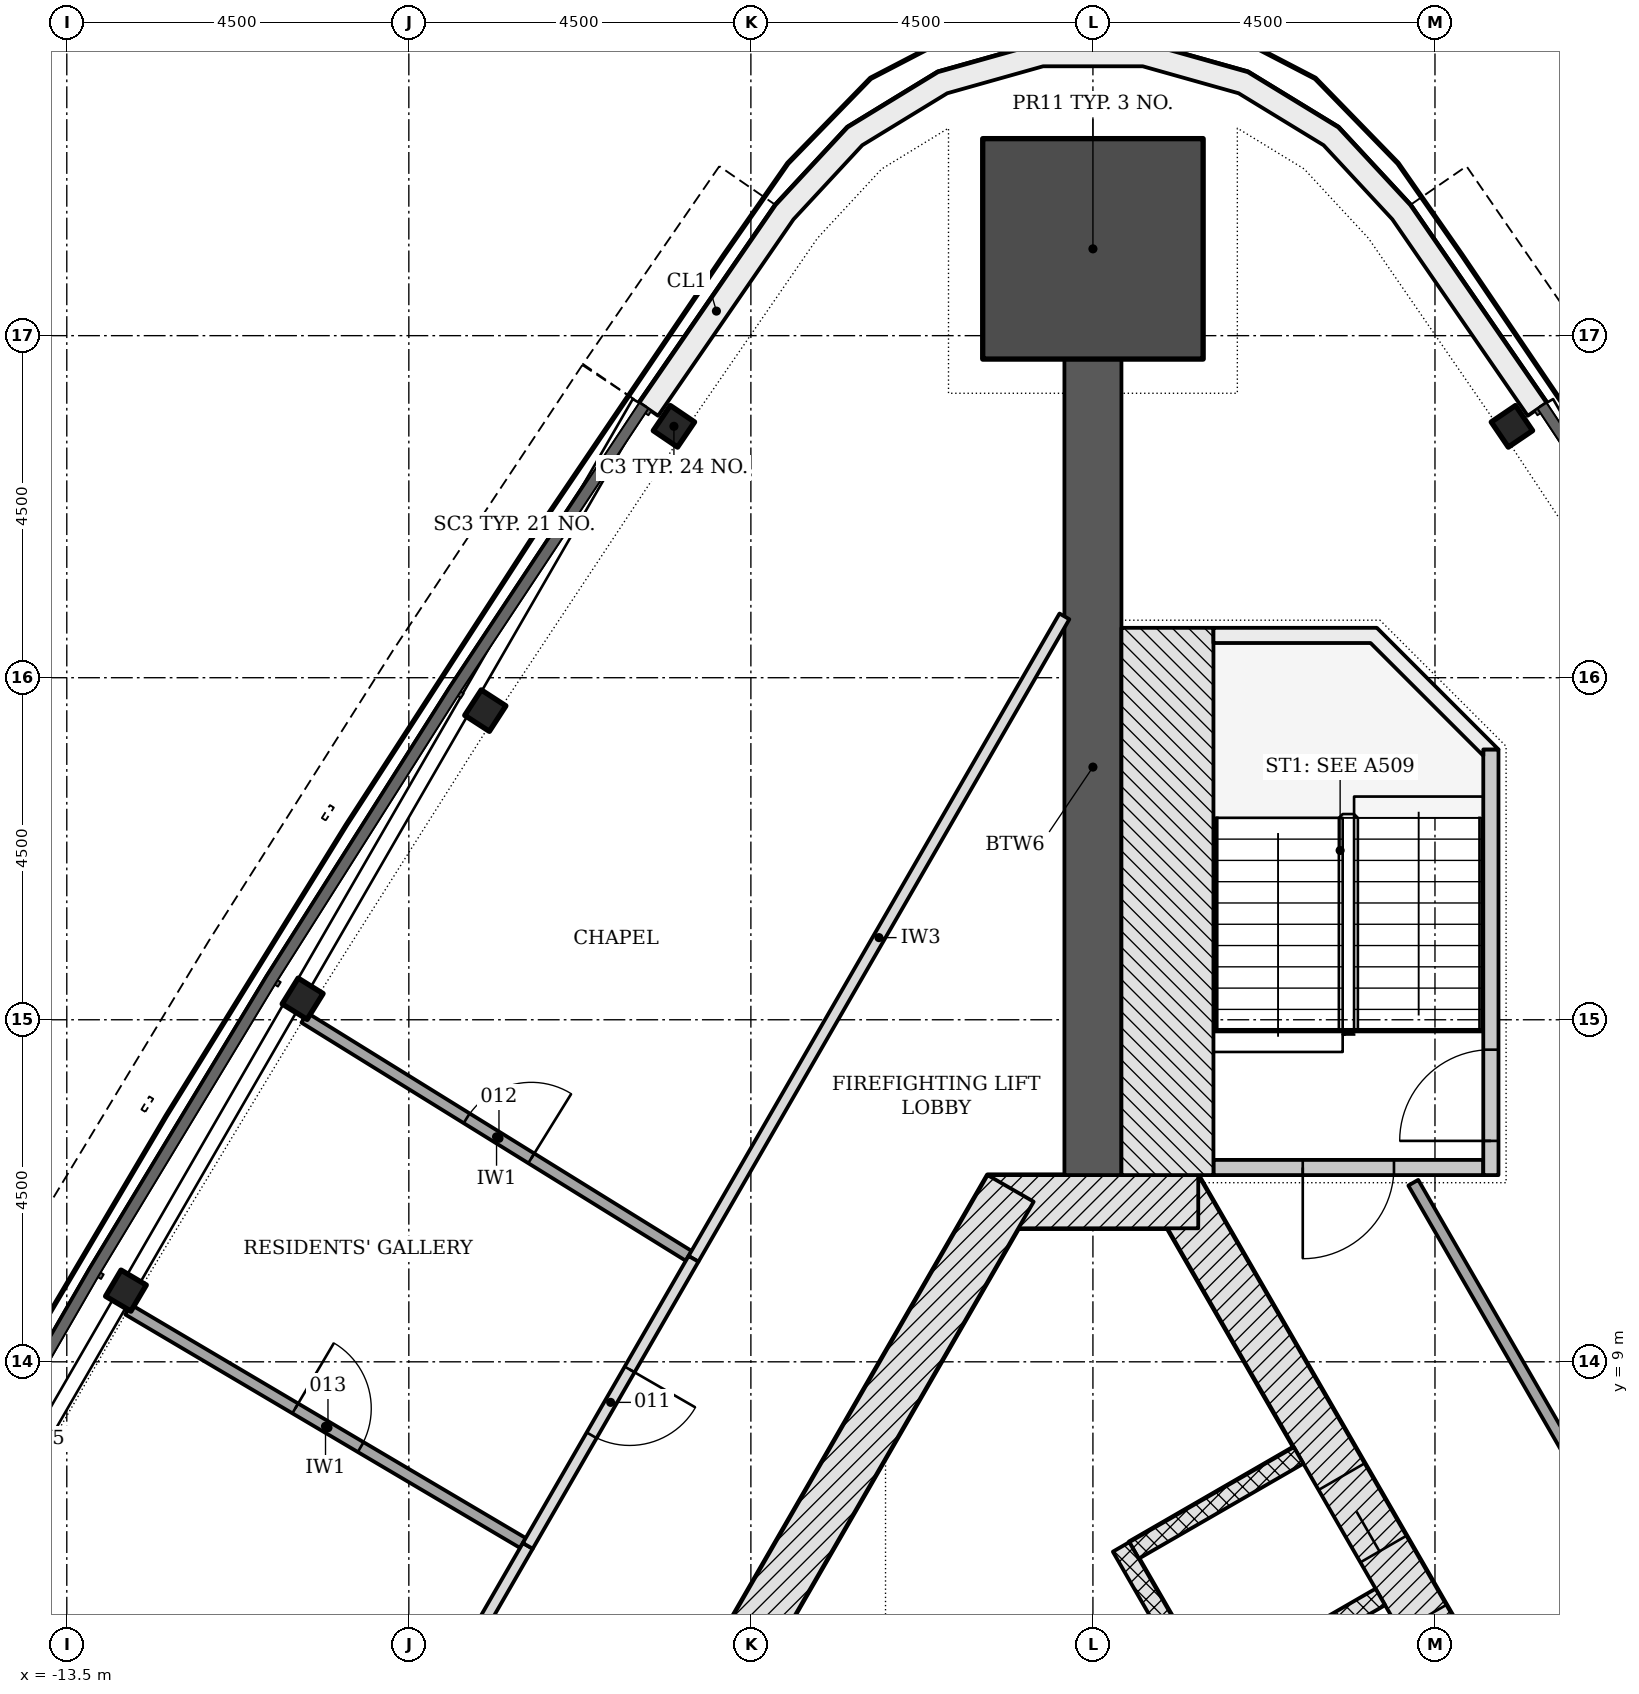
"""IFC4 building model, lengths in metres.
Left out: names, types, materials, properties, quantities, classifications, styles, units other than length and angle.
Written with IfcOpenShell. Run it as: python <this file> out.ifc"""

import sys

from ifc_helpers import new_model, si_unit, direction, frame, frame_2d, origin, origin_2d, place, context, subcontext, project, spatial, polyline, rectangle, i_section, outline, extrude, element, fill, save


model = new_model("IFC4")
c1 = context("Model", 3, precision=1e-05, world=origin(), true_north=direction((0.0, 1.0)))
c2 = subcontext(c1, "Body", "Model", "MODEL_VIEW")
j1 = project(units=[si_unit("LENGTHUNIT", "METRE"), si_unit("PLANEANGLEUNIT", "RADIAN")], contexts=[c1])
p1 = place(None, origin())
s1 = spatial("IfcSite", under=j1, at=p1, CompositionType="ELEMENT")
p2 = place(p1, origin())
s2 = spatial("IfcBuilding", under=s1, at=p2, CompositionType="ELEMENT")
p3 = place(p2, frame((0.0, 0.0, 150.9)))
s3 = spatial("IfcBuildingStorey", under=s2, at=p3, CompositionType="ELEMENT", Elevation=150.9)
p4 = place(p3, frame((10.311, -4.703, -0.2), z_axis=(0.0, 0.0, 1.0), x_axis=(-0.500001446645, 0.866024568562, 0.0)))
e1 = element("IfcWall", 1, at=p4, inside=s3, PredefinedType="SHEAR", context=c2, shape_type="SweptSolid", body=[
    extrude(rectangle(XDim=18.458, YDim=0.7, at=frame_2d((9.229, 0.0))), origin(), (0.0, 0.0, 1.0), 3.6),
])
p5 = place(p4, frame((4.379, 0.0, 0.2)))
e2 = element("IfcOpeningElement", 2, at=p5, cuts=e1, PredefinedType="OPENING", context=c2, shape_type="SweptSolid", body=[
    extrude(rectangle(XDim=1.1, YDim=2.1, at=frame_2d((0.55, 1.05))), frame((0.0, 0.36, 0.0), z_axis=(0.0, -1.0, 0.0), x_axis=(1.0, 0.0, 0.0)), (0.0, 0.0, 1.0), 0.72),
])
p6 = place(p4, frame((6.529, 0.0, 0.2)))
e3 = element("IfcOpeningElement", 3, at=p6, cuts=e1, PredefinedType="OPENING", context=c2, shape_type="SweptSolid", body=[
    extrude(rectangle(XDim=1.1, YDim=2.1, at=frame_2d((0.55, 1.05))), frame((0.0, 0.36, 0.0), z_axis=(0.0, -1.0, 0.0), x_axis=(1.0, 0.0, 0.0)), (0.0, 0.0, 1.0), 0.72),
])
p7 = place(p4, frame((8.679, 0.0, 0.2)))
e4 = element("IfcOpeningElement", 4, at=p7, cuts=e1, PredefinedType="OPENING", context=c2, shape_type="SweptSolid", body=[
    extrude(rectangle(XDim=1.1, YDim=2.1, at=frame_2d((0.55, 1.05))), frame((0.0, 0.36, 0.0), z_axis=(0.0, -1.0, 0.0), x_axis=(1.0, 0.0, 0.0)), (0.0, 0.0, 1.0), 0.72),
])
p8 = place(p4, frame((10.829, 0.0, 0.2)))
e5 = element("IfcOpeningElement", 5, at=p8, cuts=e1, PredefinedType="OPENING", context=c2, shape_type="SweptSolid", body=[
    extrude(rectangle(XDim=1.1, YDim=2.1, at=frame_2d((0.55, 1.05))), frame((0.0, 0.36, 0.0), z_axis=(0.0, -1.0, 0.0), x_axis=(1.0, 0.0, 0.0)), (0.0, 0.0, 1.0), 0.72),
])
p9 = place(p4, frame((12.979, 0.0, 0.2)))
e6 = element("IfcOpeningElement", 6, at=p9, cuts=e1, PredefinedType="OPENING", context=c2, shape_type="SweptSolid", body=[
    extrude(rectangle(XDim=1.1, YDim=2.1, at=frame_2d((0.55, 1.05))), frame((0.0, 0.36, 0.0), z_axis=(0.0, -1.0, 0.0), x_axis=(1.0, 0.0, 0.0)), (0.0, 0.0, 1.0), 0.72),
])
p10 = place(p3, frame((1.386, 11.106, -0.2), z_axis=(0.0, 0.0, 1.0), x_axis=(-1.0, 0.0, 0.0)))
e7 = element("IfcWall", 7, at=p10, inside=s3, PredefinedType="SHEAR", context=c2, shape_type="SweptSolid", body=[
    extrude(rectangle(XDim=2.771, YDim=0.7, at=frame_2d((1.386, 0.0))), origin(), (0.0, 0.0, 1.0), 3.6),
])
p11 = place(p3, frame((-1.083, 11.281, -0.2), z_axis=(0.0, 0.0, 1.0), x_axis=(-0.500001446645, -0.866024568562, 0.0)))
e8 = element("IfcWall", 8, at=p11, inside=s3, PredefinedType="SHEAR", context=c2, shape_type="SweptSolid", body=[
    extrude(rectangle(XDim=18.458, YDim=0.7, at=frame_2d((9.229, 0.0))), origin(), (0.0, 0.0, 1.0), 3.6),
])
p12 = place(p11, frame((8.979, 0.0, 0.2)))
e9 = element("IfcOpeningElement", 9, at=p12, cuts=e8, PredefinedType="OPENING", context=c2, shape_type="SweptSolid", body=[
    extrude(rectangle(XDim=1.2, YDim=2.1, at=frame_2d((0.6, 1.05))), frame((0.0, 0.36, 0.0), z_axis=(0.0, -1.0, 0.0), x_axis=(1.0, 0.0, 0.0)), (0.0, 0.0, 1.0), 0.72),
])
p13 = place(p11, frame((11.029, 0.0, 0.2)))
e10 = element("IfcOpeningElement", 10, at=p13, cuts=e8, PredefinedType="OPENING", context=c2, shape_type="SweptSolid", body=[
    extrude(rectangle(XDim=1.2, YDim=2.1, at=frame_2d((0.6, 1.05))), frame((0.0, 0.36, 0.0), z_axis=(0.0, -1.0, 0.0), x_axis=(1.0, 0.0, 0.0)), (0.0, 0.0, 1.0), 0.72),
])
p14 = place(p3, frame((0.0, 11.456, -0.2), z_axis=(0.0, 0.0, 1.0), x_axis=(0.0, 1.0, 0.0)))
e11 = element("IfcWall", 11, at=p14, inside=s3, PredefinedType="SHEAR", context=c2, shape_type="SweptSolid", body=[
    extrude(rectangle(XDim=10.736, YDim=0.75, at=frame_2d((5.368, 0.0))), origin(), (0.0, 0.0, 1.0), 3.6),
])
p15 = place(p3, frame((0.0, 23.642, -0.2), z_axis=(0.0, 0.0, 1.0), x_axis=(0.0, 1.0, 0.0)))
e12 = element("IfcColumn", 12, at=p15, inside=s3, PredefinedType="COLUMN", context=c2, shape_type="SweptSolid", body=[
    extrude(rectangle(XDim=2.9, YDim=2.9, at=origin_2d()), origin(), (0.0, 0.0, 1.0), 3.6),
])
for number, where, z_axis, x_axis in (
    (13, (-5.512, 21.307, -0.2), (0.0, 0.0, 1.0), (-0.561, -0.828, 0.0)),
    (14, (-7.994, 17.567, -0.2), (0.0, 0.0, 1.0), (-0.544, -0.839, 0.0)),
    (15, (-10.397, 13.776, -0.2), (0.0, 0.0, 1.0), (-0.527, -0.85, 0.0)),
    (16, (-12.722, 9.936, -0.2), (0.0, 0.0, 1.0), (-0.509, -0.861, 0.0)),
    (17, (5.512, 21.307, -0.2), (0.0, 0.0, 1.0), (-0.561, 0.828, 0.0)),
):
    element("IfcColumn", number, at=place(p3, frame(where, z_axis=z_axis, x_axis=x_axis)), inside=s3, PredefinedType="COLUMN", context=c2, shape_type="SweptSolid", body=[
        extrude(i_section(OverallWidth=0.399, OverallDepth=0.386, WebThickness=0.021, FlangeThickness=0.033, FilletRadius=0.015, at=origin_2d()), origin(), (0.0, 0.0, 1.0), 3.6),
    ])
p16 = place(p3, origin())
e18 = element("IfcWall", 18, at=p16, inside=s3, PredefinedType="NOTDEFINED", context=c2, shape_type="SweptSolid", body=[
    extrude(outline(polyline([(5.968, 21.616), (4.174, 24.219), (3.227, 25.24), (2.038, 25.967), (0.697, 26.344), (-0.697, 26.344), (-2.038, 25.967), (-3.227, 25.24), (-4.174, 24.219), (-5.968, 21.616), (-5.721, 21.446), (-3.939, 24.03), (-3.035, 25.005), (-1.917, 25.689), (-0.655, 26.044), (0.655, 26.044), (1.917, 25.689), (3.035, 25.005), (3.939, 24.03), (5.721, 21.446), (5.968, 21.616)])), origin(), (0.0, 0.0, 1.0), 3.3),
])
for number, where, z_axis, x_axis in (
    (19, (3.781, 5.907, -0.2), (0.0, 0.0, 1.0), (-0.866, -0.5, 0.0)),
    (20, (2.706, 7.769, -0.2), (0.0, 0.0, 1.0), (-0.866, -0.5, 0.0)),
):
    element("IfcWall", number, at=place(p3, frame(where, z_axis=z_axis, x_axis=x_axis)), inside=s3, PredefinedType="PARTITIONING", context=c2, shape_type="SweptSolid", body=[
        extrude(rectangle(XDim=2.5, YDim=0.25, at=frame_2d((1.25, 0.0))), origin(), (0.0, 0.0, 1.0), 3.6),
    ])
p17 = place(p3, frame((5.87, -2.961, 0.0), z_axis=(0.0, 0.0, 1.0), x_axis=(-0.50000615651, 0.866021849293, 0.0)))
e21 = element("IfcWall", 21, at=p17, inside=s3, PredefinedType="PARTITIONING", context=c2, shape_type="SweptSolid", body=[
    extrude(rectangle(XDim=11.0, YDim=0.25, at=frame_2d((5.5, 0.0))), origin(), (0.0, 0.0, 1.0), 3.4),
])
p18 = place(p3, frame((5.135, 11.556, -0.2), z_axis=(0.0, 0.0, 1.0), x_axis=(-1.0, 0.0, 0.0)))
e22 = element("IfcWall", 22, at=p18, inside=s3, PredefinedType="SHEAR", context=c2, shape_type="SweptSolid", body=[
    extrude(rectangle(XDim=3.55, YDim=0.2, at=frame_2d((1.775, 0.0))), origin(), (0.0, 0.0, 1.0), 3.6),
])
p19 = place(p18, frame((1.175, 0.0, 0.2)))
e23 = element("IfcOpeningElement", 23, at=p19, cuts=e22, PredefinedType="OPENING", context=c2, shape_type="SweptSolid", body=[
    extrude(rectangle(XDim=1.2, YDim=2.1, at=frame_2d((0.6, 1.05))), frame((0.0, 0.11, 0.0), z_axis=(0.0, -1.0, 0.0), x_axis=(1.0, 0.0, 0.0)), (0.0, 0.0, 1.0), 0.22),
])
p20 = place(p3, frame((5.236, 11.456, -0.2), z_axis=(0.0, 0.0, 1.0), x_axis=(0.0, 1.0, 0.0)))
e24 = element("IfcWall", 24, at=p20, inside=s3, PredefinedType="SHEAR", context=c2, shape_type="SweptSolid", body=[
    extrude(rectangle(XDim=5.6, YDim=0.2, at=frame_2d((2.8, 0.0))), origin(), (0.0, 0.0, 1.0), 3.6),
])
p21 = place(p20, frame((0.45, 0.0, 0.2)))
e25 = element("IfcOpeningElement", 25, at=p21, cuts=e24, PredefinedType="OPENING", context=c2, shape_type="SweptSolid", body=[
    extrude(rectangle(XDim=1.2, YDim=2.1, at=frame_2d((0.6, 1.05))), frame((0.0, 0.11, 0.0), z_axis=(0.0, -1.0, 0.0), x_axis=(1.0, 0.0, 0.0)), (0.0, 0.0, 1.0), 0.22),
])
p22 = place(p3, frame((0.98, 11.456, -0.2), z_axis=(0.0, 0.0, 1.0), x_axis=(0.0, 1.0, 0.0)))
e26 = element("IfcWall", 26, at=p22, inside=s3, PredefinedType="SHEAR", context=c2, shape_type="SweptSolid", body=[
    extrude(rectangle(XDim=7.2, YDim=1.211, at=frame_2d((3.6, 0.0))), origin(), (0.0, 0.0, 1.0), 3.6),
])
p23 = place(p3, frame((0.0, 0.0, -0.2)))
e27 = element("IfcWall", 27, at=p23, inside=s3, PredefinedType="SHEAR", context=c2, shape_type="SweptSolid", body=[
    extrude(outline(polyline([(5.336, 17.056), (3.736, 18.656), (1.586, 18.656), (1.586, 18.456), (3.653, 18.456), (5.135, 16.974), (5.135, 17.056), (5.135, 17.056), (5.135, 17.056), (5.135, 17.056), (5.135, 17.056), (5.135, 17.056), (5.135, 17.056), (5.135, 17.056), (5.135, 17.056), (5.135, 17.056), (5.135, 17.056), (5.135, 17.056), (5.135, 17.056), (5.135, 17.056), (5.135, 17.056), (5.135, 17.056), (5.135, 17.056), (5.336, 17.056)])), origin(), (0.0, 0.0, 1.0), 3.6),
])
p24 = place(p3, frame((9.066, 2.953, 0.0), z_axis=(0.0, 0.0, 1.0), x_axis=(-0.500003417229, 0.866023430837, 0.0)))
e28 = element("IfcWall", 28, at=p24, inside=s3, PredefinedType="PARTITIONING", context=c2, shape_type="SweptSolid", body=[
    extrude(rectangle(XDim=9.703, YDim=0.15, at=frame_2d((4.852, 0.0))), origin(), (0.0, 0.0, 1.0), 2.847),
])
p25 = place(p3, frame((-0.375, 18.807, 0.0), z_axis=(0.0, 0.0, 1.0), x_axis=(-0.500002508028, -0.866023955769, 0.0)))
e29 = element("IfcWall", 29, at=p25, inside=s3, PredefinedType="PARTITIONING", context=c2, shape_type="SweptSolid", body=[
    extrude(rectangle(XDim=9.76, YDim=0.15, at=frame_2d((4.88, 0.0))), origin(), (0.0, 0.0, 1.0), 2.847),
])
p26 = place(p3, frame((-7.435, 6.578, 0.0), z_axis=(0.0, 0.0, 1.0), x_axis=(-0.499998996204, -0.866025983326, 0.0)))
e30 = element("IfcWall", 30, at=p26, inside=s3, PredefinedType="PARTITIONING", context=c2, shape_type="SweptSolid", body=[
    extrude(rectangle(XDim=9.476, YDim=0.15, at=frame_2d((4.738, 0.0))), origin(), (0.0, 0.0, 1.0), 2.847),
])
p27 = place(p3, frame((-10.374, 13.526, 0.0), z_axis=(0.0, 0.0, 1.0), x_axis=(0.85006997005, -0.526669769418, 0.0)))
e31 = element("IfcWall", 31, at=p27, inside=s3, PredefinedType="PARTITIONING", context=c2, shape_type="SweptSolid", body=[
    extrude(rectangle(XDim=5.947, YDim=0.15, at=frame_2d((2.973, 0.0))), origin(), (0.0, 0.0, 1.0), 3.4),
])
p28 = place(p27, frame((2.511, 0.0, 0.0)))
e32 = element("IfcOpeningElement", 32, at=p28, cuts=e31, PredefinedType="OPENING", context=c2, shape_type="SweptSolid", body=[
    extrude(rectangle(XDim=1.0, YDim=2.1, at=frame_2d((0.5, 1.05))), frame((0.0, 0.085, 0.0), z_axis=(0.0, -1.0, 0.0), x_axis=(1.0, 0.0, 0.0)), (0.0, 0.0, 1.0), 0.17),
])
p29 = place(p3, frame((-12.693, 9.687, 0.0), z_axis=(0.0, 0.0, 1.0), x_axis=(0.860795979621, -0.508950175821, 0.0)))
e33 = element("IfcWall", 33, at=p29, inside=s3, PredefinedType="PARTITIONING", context=c2, shape_type="SweptSolid", body=[
    extrude(rectangle(XDim=6.033, YDim=0.15, at=frame_2d((3.016, 0.0))), origin(), (0.0, 0.0, 1.0), 3.4),
])
p30 = place(p29, frame((2.554, 0.0, 0.0)))
e34 = element("IfcOpeningElement", 34, at=p30, cuts=e33, PredefinedType="OPENING", context=c2, shape_type="SweptSolid", body=[
    extrude(rectangle(XDim=1.0, YDim=2.1, at=frame_2d((0.5, 1.05))), frame((0.0, 0.085, 0.0), z_axis=(0.0, -1.0, 0.0), x_axis=(1.0, 0.0, 0.0)), (0.0, 0.0, 1.0), 0.17),
])
p31 = place(p3, frame((-5.255, 10.355, 0.0), z_axis=(0.0, 0.0, 1.0), x_axis=(-0.499980937175, -0.866036409432, 0.0)))
e35 = element("IfcWall", 35, at=p31, inside=s3, PredefinedType="PARTITIONING", context=c2, shape_type="SweptSolid", body=[
    extrude(rectangle(XDim=4.361, YDim=0.15, at=frame_2d((2.18, 0.0))), origin(), (0.0, 0.0, 1.0), 2.847),
])
p32 = place(p31, frame((1.68, 0.0, 0.0)))
e36 = element("IfcOpeningElement", 36, at=p32, cuts=e35, PredefinedType="OPENING", context=c2, shape_type="SweptSolid", body=[
    extrude(rectangle(XDim=1.0, YDim=2.1, at=frame_2d((0.5, 1.05))), frame((0.0, 0.085, 0.0), z_axis=(0.0, -1.0, 0.0), x_axis=(1.0, 0.0, 0.0)), (0.0, 0.0, 1.0), 0.17),
])
p33 = place(p9, origin())
e37 = element("IfcDoor", 37, at=p33, inside=s3, OperationType="DOUBLE_DOOR_SLIDING", PredefinedType="DOOR", context=c2, shape_type="SweptSolid", body=[
    extrude(rectangle(XDim=1.1, YDim=2.1, at=frame_2d((0.55, 1.05))), frame((0.0, 0.025, 0.0), z_axis=(0.0, -1.0, 0.0), x_axis=(1.0, 0.0, 0.0)), (0.0, 0.0, 1.0), 0.05),
])
fill(e6, e37)
p34 = place(p19, origin())
e38 = element("IfcDoor", 38, at=p34, inside=s3, OperationType="SINGLE_SWING_RIGHT", PredefinedType="DOOR", context=c2, shape_type="SweptSolid", body=[
    extrude(rectangle(XDim=1.2, YDim=2.1, at=frame_2d((0.6, 1.05))), frame((0.0, 0.025, 0.0), z_axis=(0.0, -1.0, 0.0), x_axis=(1.0, 0.0, 0.0)), (0.0, 0.0, 1.0), 0.05),
])
fill(e23, e38)
p35 = place(p21, origin())
e39 = element("IfcDoor", 39, at=p35, inside=s3, OperationType="SINGLE_SWING_LEFT", PredefinedType="DOOR", context=c2, shape_type="SweptSolid", body=[
    extrude(rectangle(XDim=1.2, YDim=2.1, at=frame_2d((0.6, 1.05))), frame((0.0, 0.025, 0.0), z_axis=(0.0, -1.0, 0.0), x_axis=(1.0, 0.0, 0.0)), (0.0, 0.0, 1.0), 0.05),
])
fill(e25, e39)
p36 = place(p32, origin())
e40 = element("IfcDoor", 40, at=p36, inside=s3, OperationType="SINGLE_SWING_LEFT", PredefinedType="DOOR", context=c2, shape_type="SweptSolid", body=[
    extrude(rectangle(XDim=1.0, YDim=2.1, at=frame_2d((0.5, 1.05))), frame((0.0, 0.025, 0.0), z_axis=(0.0, -1.0, 0.0), x_axis=(1.0, 0.0, 0.0)), (0.0, 0.0, 1.0), 0.05),
])
fill(e36, e40)
p37 = place(p28, origin())
e41 = element("IfcDoor", 41, at=p37, inside=s3, OperationType="SINGLE_SWING_RIGHT", PredefinedType="DOOR", context=c2, shape_type="SweptSolid", body=[
    extrude(rectangle(XDim=1.0, YDim=2.1, at=frame_2d((0.5, 1.05))), frame((0.0, 0.025, 0.0), z_axis=(0.0, -1.0, 0.0), x_axis=(1.0, 0.0, 0.0)), (0.0, 0.0, 1.0), 0.05),
])
fill(e32, e41)
p38 = place(p30, origin())
e42 = element("IfcDoor", 42, at=p38, inside=s3, OperationType="SINGLE_SWING_LEFT", PredefinedType="DOOR", context=c2, shape_type="SweptSolid", body=[
    extrude(rectangle(XDim=1.0, YDim=2.1, at=frame_2d((0.5, 1.05))), frame((0.0, 0.025, 0.0), z_axis=(0.0, -1.0, 0.0), x_axis=(1.0, 0.0, 0.0)), (0.0, 0.0, 1.0), 0.05),
])
fill(e34, e42)
save(model, sys.argv[1])
